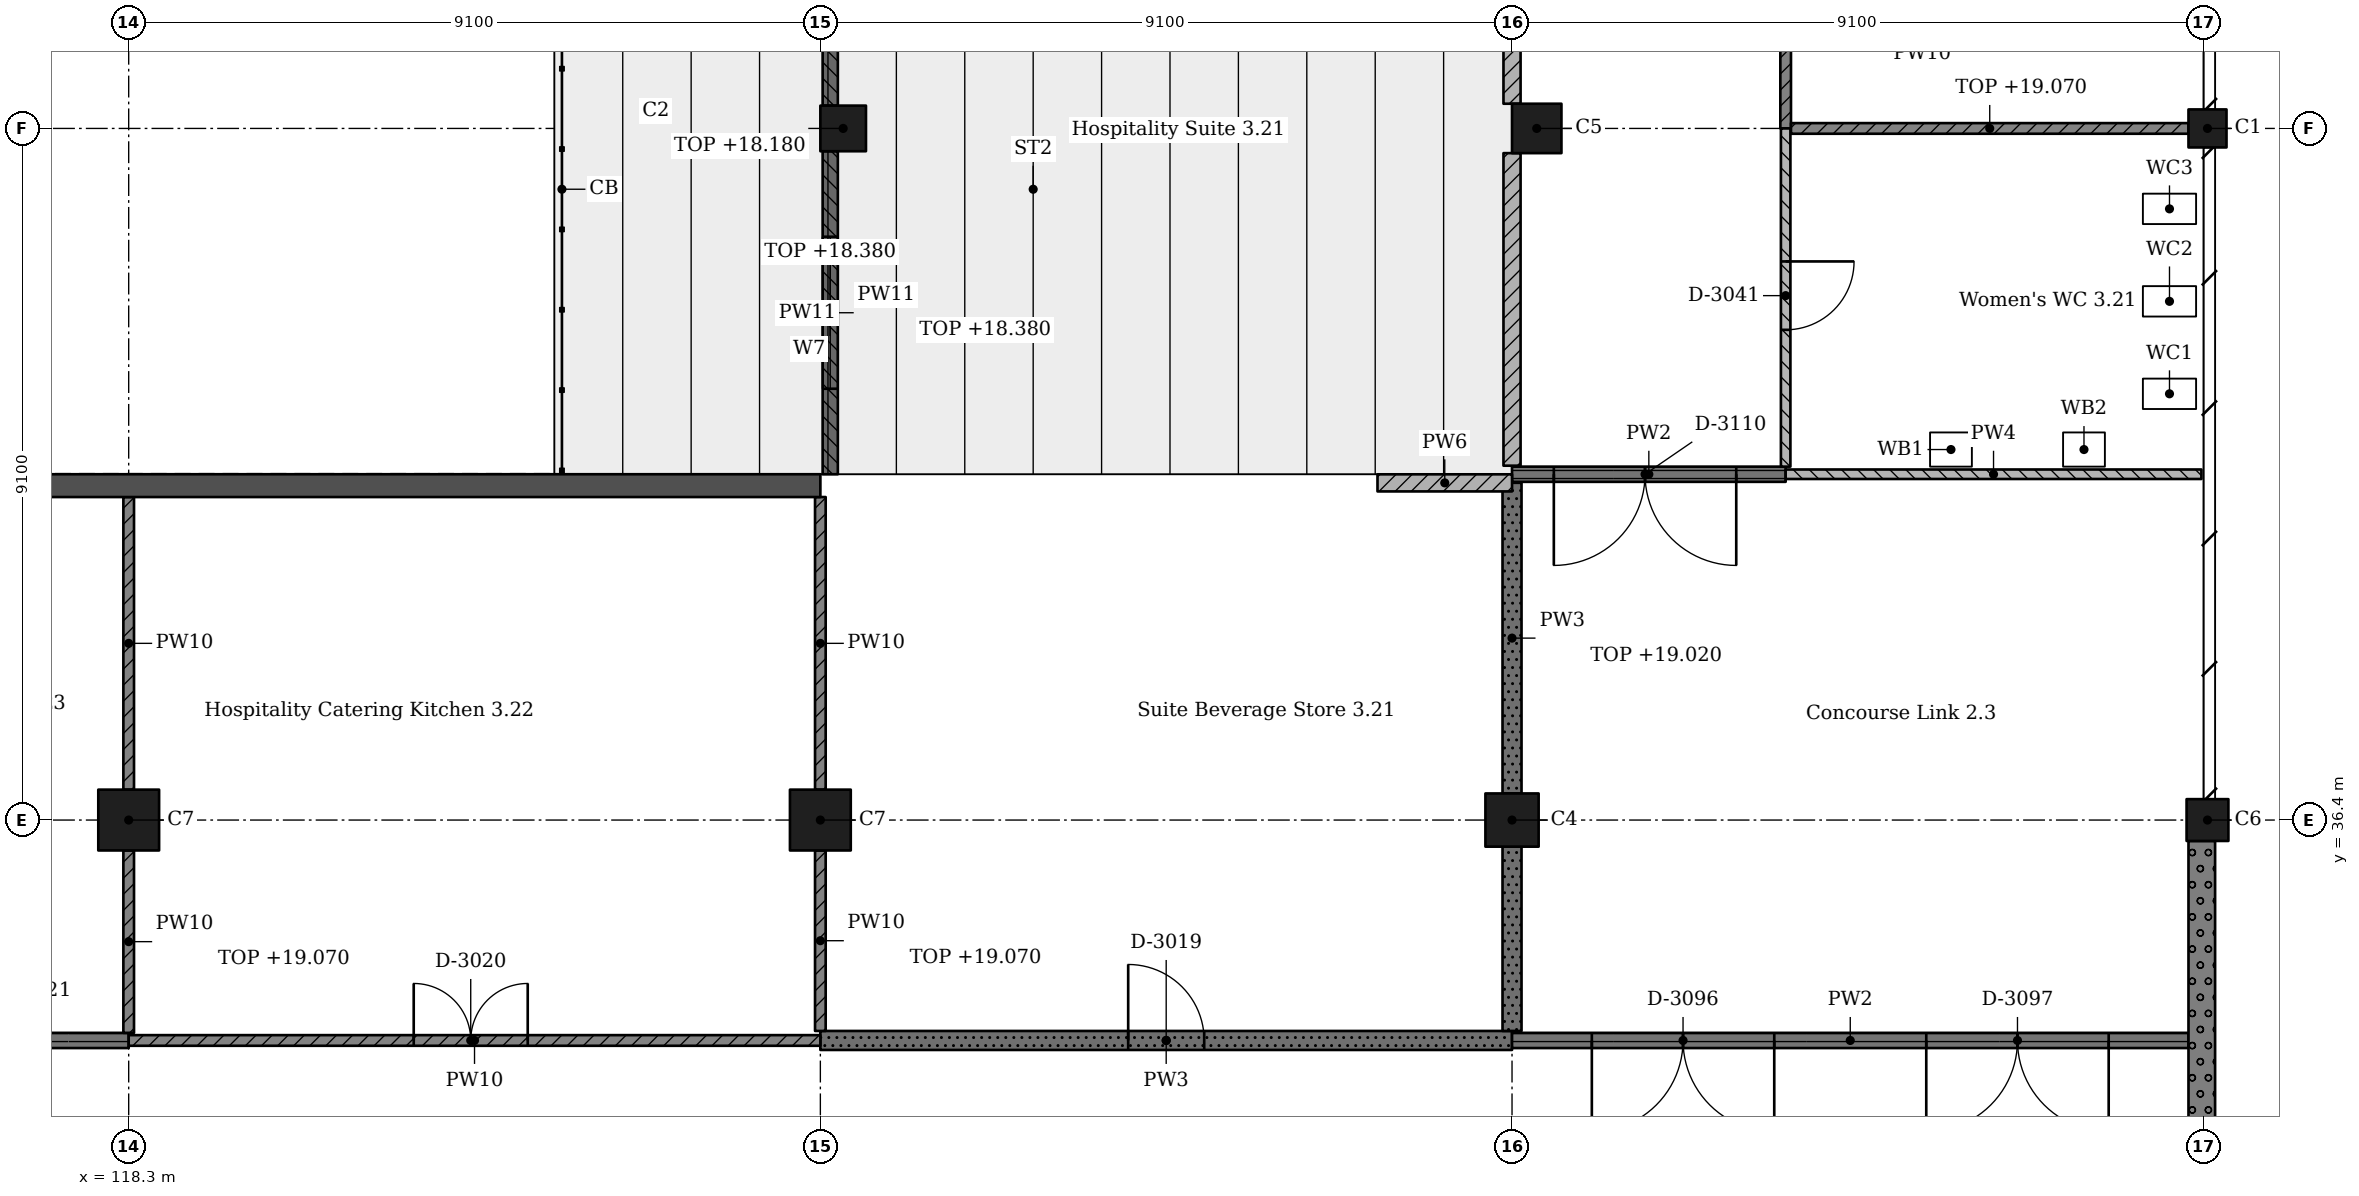
"""IFC4 building model, lengths in metres.
Left out: names, types, materials, properties, quantities, classifications, styles, units other than length and angle.
Written with IfcOpenShell. Run it as: python <this file> out.ifc"""

import sys

from ifc_helpers import new_model, si_unit, direction, frame, frame_2d, origin, origin_2d, place, context, subcontext, project, spatial, rectangle, extrude, element, fill, save


model = new_model("IFC4")
c1 = context("Model", 3, precision=1e-05, world=origin(), true_north=direction((0.0, 1.0)))
c2 = subcontext(c1, "Body", "Model", "MODEL_VIEW")
j1 = project(units=[si_unit("LENGTHUNIT", "METRE"), si_unit("PLANEANGLEUNIT", "RADIAN")], contexts=[c1])
p1 = place(None, origin())
s1 = spatial("IfcSite", under=j1, at=p1, CompositionType="ELEMENT")
p2 = place(p1, origin())
s2 = spatial("IfcBuilding", under=s1, at=p2, CompositionType="ELEMENT")
p3 = place(p2, frame((0.0, 0.0, 15.47)))
s3 = spatial("IfcBuildingStorey", under=s2, at=p3, CompositionType="ELEMENT", Elevation=15.47)
for number, where, z_axis, x_axis in (
    (1, (118.3, 36.4, 0.0), (0.0, 0.0, 1.0), (1.0, 0.0, 0.0)),
    (2, (127.4, 36.4, 0.0), (0.0, 0.0, 1.0), (1.0, 0.0, 0.0)),
):
    element("IfcColumn", number, at=place(p3, frame(where, z_axis=z_axis, x_axis=x_axis)), inside=s3, PredefinedType="COLUMN", context=c2, shape_type="SweptSolid", body=[
        extrude(rectangle(XDim=0.8, YDim=0.8, at=origin_2d()), origin(), (0.0, 0.0, 1.0), 4.55),
    ])
p4 = place(p3, frame((127.7, 45.5, 0.0), z_axis=(0.0, 0.0, 1.0), x_axis=(1.0, 0.0, 0.0)))
e3 = element("IfcColumn", 3, at=p4, inside=s3, PredefinedType="COLUMN", context=c2, shape_type="SweptSolid", body=[
    extrude(rectangle(XDim=0.6, YDim=0.6, at=origin_2d()), origin(), (0.0, 0.0, 1.0), 2.71),
])
p5 = place(p3, frame((136.5, 36.4, 0.0), z_axis=(0.0, 0.0, 1.0), x_axis=(1.0, 0.0, 0.0)))
e4 = element("IfcColumn", 4, at=p5, inside=s3, PredefinedType="COLUMN", context=c2, shape_type="SweptSolid", body=[
    extrude(rectangle(XDim=0.7, YDim=0.7, at=origin_2d()), origin(), (0.0, 0.0, 1.0), 4.55),
])
p6 = place(p3, frame((136.825, 45.5, 0.0), z_axis=(0.0, 0.0, 1.0), x_axis=(1.0, 0.0, 0.0)))
e5 = element("IfcColumn", 5, at=p6, inside=s3, PredefinedType="COLUMN", context=c2, shape_type="SweptSolid", body=[
    extrude(rectangle(XDim=0.65, YDim=0.65, at=origin_2d()), origin(), (0.0, 0.0, 1.0), 4.55),
])
p7 = place(p3, frame((145.65, 36.4, 0.0), z_axis=(0.0, 0.0, 1.0), x_axis=(1.0, 0.0, 0.0)))
e6 = element("IfcColumn", 6, at=p7, inside=s3, PredefinedType="COLUMN", context=c2, shape_type="SweptSolid", body=[
    extrude(rectangle(XDim=0.55, YDim=0.55, at=origin_2d()), origin(), (0.0, 0.0, 1.0), 4.55),
])
p8 = place(p3, frame((145.65, 45.5, 0.0), z_axis=(0.0, 0.0, 1.0), x_axis=(1.0, 0.0, 0.0)))
e7 = element("IfcColumn", 7, at=p8, inside=s3, PredefinedType="COLUMN", context=c2, shape_type="SweptSolid", body=[
    extrude(rectangle(XDim=0.5, YDim=0.5, at=origin_2d()), origin(), (0.0, 0.0, 1.0), 4.55),
])
p9 = place(p3, frame((104.65, 40.8, 0.0), z_axis=(0.0, 0.0, 1.0), x_axis=(1.0, 0.0, 0.0)))
e8 = element("IfcWall", 8, at=p9, inside=s3, PredefinedType="SHEAR", context=c2, shape_type="SweptSolid", body=[
    extrude(rectangle(XDim=22.75, YDim=0.3, at=frame_2d((11.375, 0.0))), origin(), (0.0, 0.0, 1.0), 4.55),
])
p10 = place(p3, frame((145.575, 27.55, 0.0), z_axis=(0.0, 0.0, 1.0), x_axis=(0.0, 1.0, 0.0)))
e9 = element("IfcWall", 9, at=p10, inside=s3, PredefinedType="SOLIDWALL", context=c2, shape_type="SweptSolid", body=[
    extrude(rectangle(XDim=8.575, YDim=0.35, at=frame_2d((4.288, 0.0))), origin(), (0.0, 0.0, 1.0), 3.55),
])
p11 = place(p3, frame((118.3, 33.5, 0.0), z_axis=(0.0, 0.0, 1.0), x_axis=(-1.0, 0.0, 0.0)))
e10 = element("IfcWall", 10, at=p11, inside=s3, PredefinedType="PARTITIONING", context=c2, shape_type="SweptSolid", body=[
    extrude(rectangle(XDim=4.65, YDim=0.2, at=frame_2d((2.325, 0.0))), origin(), (0.0, 0.0, 1.0), 4.3),
])
p12 = place(p11, frame((1.85, 0.0, 0.0)))
e11 = element("IfcOpeningElement", 11, at=p12, cuts=e10, PredefinedType="OPENING", context=c2, shape_type="SweptSolid", body=[
    extrude(rectangle(XDim=1.0, YDim=2.1, at=frame_2d((0.5, 1.05))), frame((0.0, 0.11, 0.0), z_axis=(0.0, -1.0, 0.0), x_axis=(1.0, 0.0, 0.0)), (0.0, 0.0, 1.0), 0.22),
])
p13 = place(p3, frame((118.3, 33.6, 0.0), z_axis=(0.0, 0.0, 1.0), x_axis=(0.0, 1.0, 0.0)))
e12 = element("IfcWall", 12, at=p13, inside=s3, PredefinedType="SOLIDWALL", context=c2, shape_type="SweptSolid", body=[
    extrude(rectangle(XDim=2.4, YDim=0.14, at=frame_2d((1.2, 0.0))), origin(), (0.0, 0.0, 1.0), 3.6),
])
p14 = place(p3, frame((118.3, 36.8, 0.0), z_axis=(0.0, 0.0, 1.0), x_axis=(0.0, 1.0, 0.0)))
e13 = element("IfcWall", 13, at=p14, inside=s3, PredefinedType="SOLIDWALL", context=c2, shape_type="SweptSolid", body=[
    extrude(rectangle(XDim=3.85, YDim=0.14, at=frame_2d((1.925, 0.0))), origin(), (0.0, 0.0, 1.0), 4.3),
])
p15 = place(p3, frame((127.4, 33.5, 0.0), z_axis=(0.0, 0.0, 1.0), x_axis=(-1.0, 0.0, 0.0)))
e14 = element("IfcWall", 14, at=p15, inside=s3, PredefinedType="SOLIDWALL", context=c2, shape_type="SweptSolid", body=[
    extrude(rectangle(XDim=9.1, YDim=0.14, at=frame_2d((4.55, 0.0))), origin(), (0.0, 0.0, 1.0), 4.3),
])
p16 = place(p15, frame((3.85, 0.0, 0.0)))
e15 = element("IfcOpeningElement", 15, at=p16, cuts=e14, PredefinedType="OPENING", context=c2, shape_type="SweptSolid", body=[
    extrude(rectangle(XDim=1.5, YDim=2.1, at=frame_2d((0.75, 1.05))), frame((0.0, 0.08, 0.0), z_axis=(0.0, -1.0, 0.0), x_axis=(1.0, 0.0, 0.0)), (0.0, 0.0, 1.0), 0.16),
])
p17 = place(p3, frame((127.4, 33.625, 0.0), z_axis=(0.0, 0.0, 1.0), x_axis=(0.0, 1.0, 0.0)))
e16 = element("IfcWall", 16, at=p17, inside=s3, PredefinedType="SOLIDWALL", context=c2, shape_type="SweptSolid", body=[
    extrude(rectangle(XDim=2.375, YDim=0.14, at=frame_2d((1.188, 0.0))), origin(), (0.0, 0.0, 1.0), 3.6),
])
p18 = place(p3, frame((127.4, 36.8, 0.0), z_axis=(0.0, 0.0, 1.0), x_axis=(0.0, 1.0, 0.0)))
e17 = element("IfcWall", 17, at=p18, inside=s3, PredefinedType="SOLIDWALL", context=c2, shape_type="SweptSolid", body=[
    extrude(rectangle(XDim=3.85, YDim=0.14, at=frame_2d((1.925, 0.0))), origin(), (0.0, 0.0, 1.0), 4.3),
])
p19 = place(p3, frame((134.73, 40.836, 0.0), z_axis=(0.0, 0.0, 1.0), x_axis=(1.0, 0.0, 0.0)))
e18 = element("IfcWall", 18, at=p19, inside=s3, PredefinedType="PARTITIONING", context=c2, shape_type="SweptSolid", body=[
    extrude(rectangle(XDim=1.77, YDim=0.225, at=frame_2d((0.885, 0.0))), origin(), (0.0, 0.0, 1.0), 4.3),
])
p20 = place(p3, frame((136.5, 33.5, 0.0), z_axis=(0.0, 0.0, 1.0), x_axis=(-1.0, 0.0, 0.0)))
e19 = element("IfcWall", 19, at=p20, inside=s3, PredefinedType="SOLIDWALL", context=c2, shape_type="SweptSolid", body=[
    extrude(rectangle(XDim=9.1, YDim=0.25, at=frame_2d((4.55, 0.0))), origin(), (0.0, 0.0, 1.0), 4.3),
])
p21 = place(p20, frame((4.05, 0.0, 0.0)))
e20 = element("IfcOpeningElement", 20, at=p21, cuts=e19, PredefinedType="OPENING", context=c2, shape_type="SweptSolid", body=[
    extrude(rectangle(XDim=1.0, YDim=2.1, at=frame_2d((0.5, 1.05))), frame((0.0, 0.135, 0.0), z_axis=(0.0, -1.0, 0.0), x_axis=(1.0, 0.0, 0.0)), (0.0, 0.0, 1.0), 0.27),
])
p22 = place(p3, frame((136.5, 33.5, 0.0), z_axis=(0.0, 0.0, 1.0), x_axis=(1.0, 0.0, 0.0)))
e21 = element("IfcWall", 21, at=p22, inside=s3, PredefinedType="PARTITIONING", context=c2, shape_type="SweptSolid", body=[
    extrude(rectangle(XDim=8.9, YDim=0.2, at=frame_2d((4.45, 0.0))), origin(), (0.0, 0.0, 1.0), 4.3),
])
p23 = place(p22, frame((1.05, 0.0, 0.0)))
e22 = element("IfcOpeningElement", 22, at=p23, cuts=e21, PredefinedType="OPENING", context=c2, shape_type="SweptSolid", body=[
    extrude(rectangle(XDim=2.4, YDim=2.4, at=frame_2d((1.2, 1.2))), frame((0.0, 0.11, 0.0), z_axis=(0.0, -1.0, 0.0), x_axis=(1.0, 0.0, 0.0)), (0.0, 0.0, 1.0), 0.22),
])
p24 = place(p22, frame((5.45, 0.0, 0.0)))
e23 = element("IfcOpeningElement", 23, at=p24, cuts=e21, PredefinedType="OPENING", context=c2, shape_type="SweptSolid", body=[
    extrude(rectangle(XDim=2.4, YDim=2.4, at=frame_2d((1.2, 1.2))), frame((0.0, 0.11, 0.0), z_axis=(0.0, -1.0, 0.0), x_axis=(1.0, 0.0, 0.0)), (0.0, 0.0, 1.0), 0.22),
])
p25 = place(p3, frame((136.5, 36.05, 0.0), z_axis=(0.0, 0.0, 1.0), x_axis=(0.0, -1.0, 0.0)))
e24 = element("IfcWall", 24, at=p25, inside=s3, PredefinedType="SOLIDWALL", context=c2, shape_type="SweptSolid", body=[
    extrude(rectangle(XDim=2.425, YDim=0.25, at=frame_2d((1.212, 0.0))), origin(), (0.0, 0.0, 1.0), 3.55),
])
p26 = place(p3, frame((136.5, 40.837, 0.0), z_axis=(0.0, 0.0, 1.0), x_axis=(0.0, -1.0, 0.0)))
e25 = element("IfcWall", 25, at=p26, inside=s3, PredefinedType="SOLIDWALL", context=c2, shape_type="SweptSolid", body=[
    extrude(rectangle(XDim=4.087, YDim=0.25, at=frame_2d((2.044, 0.0))), origin(), (0.0, 0.0, 1.0), 3.55),
])
p27 = place(p3, frame((136.5, 40.95, 0.0), z_axis=(0.0, 0.0, 1.0), x_axis=(1.0, 0.0, 0.0)))
e26 = element("IfcWall", 26, at=p27, inside=s3, PredefinedType="PARTITIONING", context=c2, shape_type="SweptSolid", body=[
    extrude(rectangle(XDim=3.6, YDim=0.2, at=frame_2d((1.8, 0.0))), origin(), (0.0, 0.0, 1.0), 4.3),
])
p28 = place(p27, frame((0.55, 0.0, 0.0)))
e27 = element("IfcOpeningElement", 27, at=p28, cuts=e26, PredefinedType="OPENING", context=c2, shape_type="SweptSolid", body=[
    extrude(rectangle(XDim=2.4, YDim=2.4, at=frame_2d((1.2, 1.2))), frame((0.0, 0.11, 0.0), z_axis=(0.0, -1.0, 0.0), x_axis=(1.0, 0.0, 0.0)), (0.0, 0.0, 1.0), 0.22),
])
p29 = place(p3, frame((136.5, 41.062, 0.0), z_axis=(0.0, 0.0, 1.0), x_axis=(0.0, 1.0, 0.0)))
e28 = element("IfcWall", 28, at=p29, inside=s3, PredefinedType="PARTITIONING", context=c2, shape_type="SweptSolid", body=[
    extrude(rectangle(XDim=4.113, YDim=0.225, at=frame_2d((2.056, 0.0))), origin(), (0.0, 0.0, 1.0), 3.55),
])
p30 = place(p3, frame((136.5, 45.825, 0.0), z_axis=(0.0, 0.0, 1.0), x_axis=(0.0, 1.0, 0.0)))
e29 = element("IfcWall", 29, at=p30, inside=s3, PredefinedType="PARTITIONING", context=c2, shape_type="SweptSolid", body=[
    extrude(rectangle(XDim=8.45, YDim=0.225, at=frame_2d((4.225, 0.0))), origin(), (0.0, 0.0, 1.0), 3.55),
])
p31 = place(p30, frame((3.75, 0.0, 0.0)))
e30 = element("IfcOpeningElement", 30, at=p31, cuts=e29, PredefinedType="OPENING", context=c2, shape_type="SweptSolid", body=[
    extrude(rectangle(XDim=1.0, YDim=2.4, at=frame_2d((0.5, 1.2))), frame((0.0, 0.123, 0.0), z_axis=(0.0, -1.0, 0.0), x_axis=(1.0, 0.0, 0.0)), (0.0, 0.0, 1.0), 0.245),
])
p32 = place(p3, frame((140.1, 40.95, 0.0), z_axis=(0.0, 0.0, 1.0), x_axis=(1.0, 0.0, 0.0)))
e31 = element("IfcWall", 31, at=p32, inside=s3, PredefinedType="PARTITIONING", context=c2, shape_type="SweptSolid", body=[
    extrude(rectangle(XDim=5.47, YDim=0.125, at=frame_2d((2.735, 0.0))), origin(), (0.0, 0.0, 1.0), 4.3),
])
p33 = place(p3, frame((140.1, 45.5, 0.0), z_axis=(0.0, 0.0, 1.0), x_axis=(0.0, -1.0, 0.0)))
e32 = element("IfcWall", 32, at=p33, inside=s3, PredefinedType="PARTITIONING", context=c2, shape_type="SweptSolid", body=[
    extrude(rectangle(XDim=4.45, YDim=0.125, at=frame_2d((2.225, 0.0))), origin(), (0.0, 0.0, 1.0), 4.3),
])
p34 = place(p33, frame((1.75, 0.0, 0.0)))
e33 = element("IfcOpeningElement", 33, at=p34, cuts=e32, PredefinedType="OPENING", context=c2, shape_type="SweptSolid", body=[
    extrude(rectangle(XDim=0.9, YDim=2.1, at=frame_2d((0.45, 1.05))), frame((0.0, 0.073, 0.0), z_axis=(0.0, -1.0, 0.0), x_axis=(1.0, 0.0, 0.0)), (0.0, 0.0, 1.0), 0.145),
])
p35 = place(p3, frame((140.1, 54.6, 0.0), z_axis=(0.0, 0.0, 1.0), x_axis=(0.0, -1.0, 0.0)))
e34 = element("IfcWall", 34, at=p35, inside=s3, PredefinedType="SOLIDWALL", context=c2, shape_type="SweptSolid", body=[
    extrude(rectangle(XDim=9.1, YDim=0.14, at=frame_2d((4.55, 0.0))), origin(), (0.0, 0.0, 1.0), 4.3),
])
p36 = place(p35, frame((3.75, 0.0, 0.0)))
e35 = element("IfcOpeningElement", 35, at=p36, cuts=e34, PredefinedType="OPENING", context=c2, shape_type="SweptSolid", body=[
    extrude(rectangle(XDim=1.5, YDim=2.1, at=frame_2d((0.75, 1.05))), frame((0.0, 0.08, 0.0), z_axis=(0.0, -1.0, 0.0), x_axis=(1.0, 0.0, 0.0)), (0.0, 0.0, 1.0), 0.16),
])
p37 = place(p3, frame((140.17, 45.5, 0.0), z_axis=(0.0, 0.0, 1.0), x_axis=(1.0, 0.0, 0.0)))
e36 = element("IfcWall", 36, at=p37, inside=s3, PredefinedType="SOLIDWALL", context=c2, shape_type="SweptSolid", body=[
    extrude(rectangle(XDim=5.23, YDim=0.14, at=frame_2d((2.615, 0.0))), origin(), (0.0, 0.0, 1.0), 3.6),
])
p38 = place(p3, frame((127.53, 40.95, 0.0), z_axis=(0.0, 0.0, 1.0), x_axis=(0.0, 1.0, 0.0)))
e37 = element("IfcWall", 37, at=p38, inside=s3, PredefinedType="PARTITIONING", context=c2, shape_type="SweptSolid", body=[
    extrude(rectangle(XDim=4.25, YDim=0.2, at=frame_2d((2.125, 0.0))), origin(), (0.0, 0.0, 1.0), 2.91),
])
p39 = place(p38, frame((1.125, 0.0, 1.1)))
e38 = element("IfcOpeningElement", 38, at=p39, cuts=e37, PredefinedType="OPENING", context=c2, shape_type="SweptSolid", body=[
    extrude(rectangle(XDim=2.0, YDim=1.3, at=frame_2d((1.0, 0.65))), frame((0.0, 0.11, 0.0), z_axis=(0.0, -1.0, 0.0), x_axis=(1.0, 0.0, 0.0)), (0.0, 0.0, 1.0), 0.22),
])
p40 = place(p3, frame((127.53, 45.8, 0.0), z_axis=(0.0, 0.0, 1.0), x_axis=(0.0, 1.0, 0.0)))
e39 = element("IfcWall", 39, at=p40, inside=s3, PredefinedType="PARTITIONING", context=c2, shape_type="SweptSolid", body=[
    extrude(rectangle(XDim=8.5, YDim=0.2, at=frame_2d((4.25, 0.0))), origin(), (0.0, 0.0, 1.0), 2.71),
])
p41 = place(p40, frame((1.25, 0.0, 1.1)))
e40 = element("IfcOpeningElement", 40, at=p41, cuts=e39, PredefinedType="OPENING", context=c2, shape_type="SweptSolid", body=[
    extrude(rectangle(XDim=6.0, YDim=1.3, at=frame_2d((3.0, 0.65))), frame((0.0, 0.11, 0.0), z_axis=(0.0, -1.0, 0.0), x_axis=(1.0, 0.0, 0.0)), (0.0, 0.0, 1.0), 0.22),
])
p42 = place(p39, origin())
e41 = element("IfcWindow", 41, at=p42, inside=s3, PartitioningType="SINGLE_PANEL", PredefinedType="WINDOW", context=c2, shape_type="SweptSolid", body=[
    extrude(rectangle(XDim=2.0, YDim=1.3, at=frame_2d((1.0, 0.65))), frame((0.0, 0.03, 0.0), z_axis=(0.0, -1.0, 0.0), x_axis=(1.0, 0.0, 0.0)), (0.0, 0.0, 1.0), 0.06),
])
fill(e38, e41)
p43 = place(p21, origin())
e42 = element("IfcDoor", 42, at=p43, inside=s3, OperationType="SINGLE_SWING_RIGHT", PredefinedType="DOOR", context=c2, shape_type="SweptSolid", body=[
    extrude(rectangle(XDim=1.0, YDim=2.1, at=frame_2d((0.5, 1.05))), frame((0.0, 0.025, 0.0), z_axis=(0.0, -1.0, 0.0), x_axis=(1.0, 0.0, 0.0)), (0.0, 0.0, 1.0), 0.05),
])
fill(e20, e42)
p44 = place(p16, origin())
e43 = element("IfcDoor", 43, at=p44, inside=s3, OperationType="DOUBLE_DOOR_SINGLE_SWING", PredefinedType="DOOR", context=c2, shape_type="SweptSolid", body=[
    extrude(rectangle(XDim=1.5, YDim=2.1, at=frame_2d((0.75, 1.05))), frame((0.0, 0.025, 0.0), z_axis=(0.0, -1.0, 0.0), x_axis=(1.0, 0.0, 0.0)), (0.0, 0.0, 1.0), 0.05),
])
fill(e15, e43)
p45 = place(p34, origin())
e44 = element("IfcDoor", 44, at=p45, inside=s3, OperationType="SINGLE_SWING_RIGHT", PredefinedType="DOOR", context=c2, shape_type="SweptSolid", body=[
    extrude(rectangle(XDim=0.9, YDim=2.1, at=frame_2d((0.45, 1.05))), frame((0.0, 0.025, 0.0), z_axis=(0.0, -1.0, 0.0), x_axis=(1.0, 0.0, 0.0)), (0.0, 0.0, 1.0), 0.05),
])
fill(e33, e44)
p46 = place(p23, origin())
e45 = element("IfcDoor", 45, at=p46, inside=s3, OperationType="DOUBLE_DOOR_SINGLE_SWING", PredefinedType="DOOR", context=c2, shape_type="SweptSolid", body=[
    extrude(rectangle(XDim=2.4, YDim=2.4, at=frame_2d((1.2, 1.2))), frame((0.0, 0.025, 0.0), z_axis=(0.0, -1.0, 0.0), x_axis=(1.0, 0.0, 0.0)), (0.0, 0.0, 1.0), 0.05),
])
fill(e22, e45)
p47 = place(p24, origin())
e46 = element("IfcDoor", 46, at=p47, inside=s3, OperationType="DOUBLE_DOOR_SINGLE_SWING", PredefinedType="DOOR", context=c2, shape_type="SweptSolid", body=[
    extrude(rectangle(XDim=2.4, YDim=2.4, at=frame_2d((1.2, 1.2))), frame((0.0, 0.025, 0.0), z_axis=(0.0, -1.0, 0.0), x_axis=(1.0, 0.0, 0.0)), (0.0, 0.0, 1.0), 0.05),
])
fill(e23, e46)
p48 = place(p28, origin())
e47 = element("IfcDoor", 47, at=p48, inside=s3, OperationType="DOUBLE_DOOR_SINGLE_SWING", PredefinedType="DOOR", context=c2, shape_type="SweptSolid", body=[
    extrude(rectangle(XDim=2.4, YDim=2.4, at=frame_2d((1.2, 1.2))), frame((0.0, 0.025, 0.0), z_axis=(0.0, -1.0, 0.0), x_axis=(1.0, 0.0, 0.0)), (0.0, 0.0, 1.0), 0.05),
])
fill(e27, e47)
save(model, sys.argv[1])
